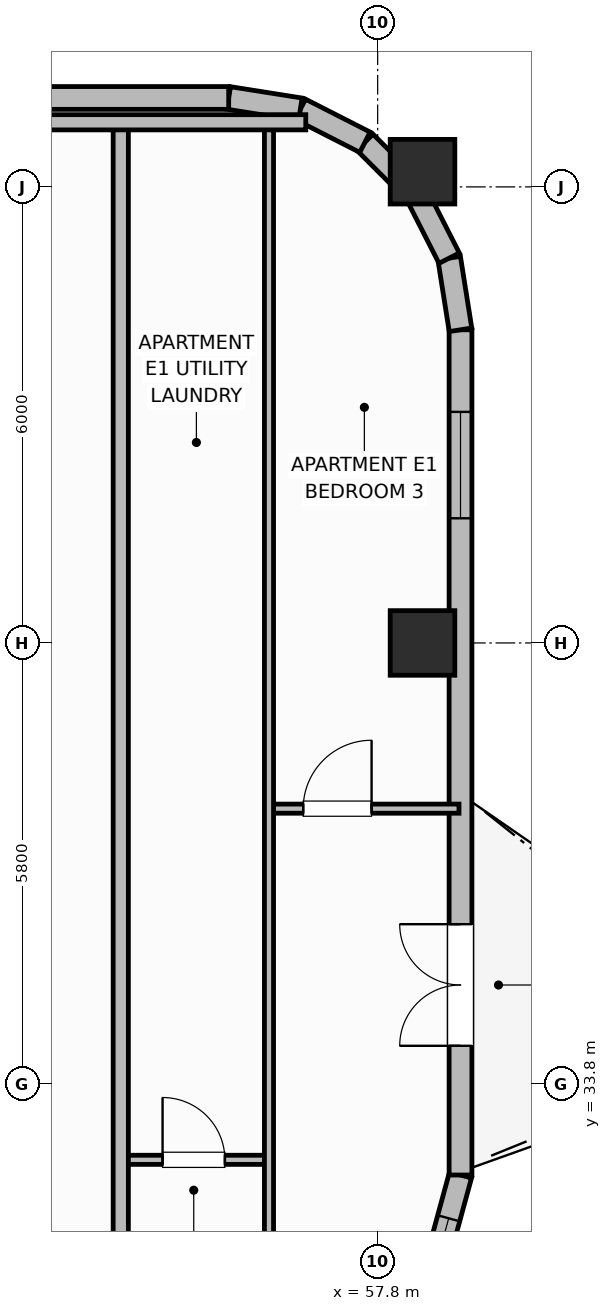
"""IFC4 building model, lengths in metres.
Left out: names, types, materials, properties, quantities, classifications, styles, units other than length and angle.
Written with IfcOpenShell. Run it as: python <this file> out.ifc"""

import sys

from ifc_helpers import new_model, si_unit, direction, frame, frame_2d, origin, origin_2d, place, context, subcontext, project, spatial, rectangle, extrude, element, fill, save


model = new_model("IFC4")
c1 = context("Model", 3, precision=1e-05, world=origin(), true_north=direction((0.0, 1.0)))
c2 = subcontext(c1, "Body", "Model", "MODEL_VIEW")
j1 = project(units=[si_unit("LENGTHUNIT", "METRE"), si_unit("PLANEANGLEUNIT", "RADIAN")], contexts=[c1])
p1 = place(None, origin())
s1 = spatial("IfcSite", under=j1, at=p1, CompositionType="ELEMENT")
p2 = place(p1, origin())
s2 = spatial("IfcBuilding", under=s1, at=p2, CompositionType="ELEMENT")
p3 = place(p2, frame((0.0, 0.0, 248.0)))
s3 = spatial("IfcBuildingStorey", under=s2, at=p3, CompositionType="ELEMENT", Elevation=248.0)
for number, where, z_axis, x_axis in (
    (1, (58.39, 39.6, 0.0), (0.0, 0.0, 1.0), (1.0, 0.0, 0.0)),
    (2, (58.39, 45.8, 0.0), (0.0, 0.0, 1.0), (1.0, 0.0, 0.0)),
):
    element("IfcColumn", number, at=place(p3, frame(where, z_axis=z_axis, x_axis=x_axis)), inside=s3, PredefinedType="COLUMN", context=c2, shape_type="SweptSolid", body=[
        extrude(rectangle(XDim=0.85, YDim=0.85, at=origin_2d()), origin(), (0.0, 0.0, 1.0), 3.7),
    ])
p4 = place(p3, frame((58.29, 30.4, 0.0), z_axis=(0.0, 0.0, 1.0), x_axis=(0.263035877812, 0.96478605244, 0.0)))
e3 = element("IfcWall", 3, at=p4, inside=s3, PredefinedType="SOLIDWALL", context=c2, shape_type="SweptSolid", body=[
    extrude(rectangle(XDim=2.281, YDim=0.3, at=frame_2d((1.14, 0.0))), origin(), (0.0, 0.0, 1.0), 2.73),
])
p5 = place(p4, frame((0.59, 0.0, 0.92)))
e4 = element("IfcOpeningElement", 4, at=p5, cuts=e3, PredefinedType="OPENING", context=c2, shape_type="SweptSolid", body=[
    extrude(rectangle(XDim=1.1, YDim=1.65, at=frame_2d((0.55, 0.825))), frame((0.0, 0.16, 0.0), z_axis=(0.0, -1.0, 0.0), x_axis=(1.0, 0.0, 0.0)), (0.0, 0.0, 1.0), 0.32),
])
p6 = place(p3, frame((58.89, 32.6, 0.0), z_axis=(0.0, 0.0, 1.0), x_axis=(0.0, 1.0, 0.0)))
e5 = element("IfcWall", 5, at=p6, inside=s3, PredefinedType="SOLIDWALL", context=c2, shape_type="SweptSolid", body=[
    extrude(rectangle(XDim=11.12, YDim=0.3, at=frame_2d((5.56, 0.0))), origin(), (0.0, 0.0, 1.0), 2.73),
])
p7 = place(p6, frame((1.7, 0.0, 0.0)))
e6 = element("IfcOpeningElement", 6, at=p7, cuts=e5, PredefinedType="OPENING", context=c2, shape_type="SweptSolid", body=[
    extrude(rectangle(XDim=1.6, YDim=2.1, at=frame_2d((0.8, 1.05))), frame((0.0, 0.16, 0.0), z_axis=(0.0, -1.0, 0.0), x_axis=(1.0, 0.0, 0.0)), (0.0, 0.0, 1.0), 0.32),
])
p8 = place(p6, frame((8.64, 0.0, 0.72)))
e7 = element("IfcOpeningElement", 7, at=p8, cuts=e5, PredefinedType="OPENING", context=c2, shape_type="SweptSolid", body=[
    extrude(rectangle(XDim=1.4, YDim=1.85, at=frame_2d((0.7, 0.925))), frame((0.0, 0.16, 0.0), z_axis=(0.0, -1.0, 0.0), x_axis=(1.0, 0.0, 0.0)), (0.0, 0.0, 1.0), 0.32),
])
p9 = place(p3, frame((58.89, 43.72, 0.0), z_axis=(0.0, 0.0, 1.0), x_axis=(-0.156304114255, 0.987708977314, 0.0)))
e8 = element("IfcWall", 8, at=p9, inside=s3, PredefinedType="SOLIDWALL", context=c2, shape_type="SweptSolid", body=[
    extrude(rectangle(XDim=0.954, YDim=0.3, at=frame_2d((0.477, 0.0))), origin(), (0.0, 0.0, 1.0), 2.73),
])
p10 = place(p3, frame((58.741, 44.663, 0.0), z_axis=(0.0, 0.0, 1.0), x_axis=(-0.45395644796, 0.891023873617, 0.0)))
e9 = element("IfcWall", 9, at=p10, inside=s3, PredefinedType="SOLIDWALL", context=c2, shape_type="SweptSolid", body=[
    extrude(rectangle(XDim=0.954, YDim=0.3, at=frame_2d((0.477, 0.0))), origin(), (0.0, 0.0, 1.0), 2.73),
])
for number, where, z_axis, x_axis in (
    (10, (58.308, 45.513, 0.0), (0.0, 0.0, 1.0), (-0.707, 0.707, 0.0)),
    (11, (57.633, 46.188, 0.0), (0.0, 0.0, 1.0), (-0.891, 0.454, 0.0)),
):
    element("IfcWall", number, at=place(p3, frame(where, z_axis=z_axis, x_axis=x_axis)), inside=s3, PredefinedType="SOLIDWALL", context=c2, shape_type="SweptSolid", body=[
        extrude(rectangle(XDim=0.954, YDim=0.3, at=frame_2d((0.477, 0.0))), origin(), (0.0, 0.0, 1.0), 2.73),
    ])
p11 = place(p3, frame((56.782, 46.621, 0.0), z_axis=(0.0, 0.0, 1.0), x_axis=(-0.987663181641, 0.156593229835, 0.0)))
e12 = element("IfcWall", 12, at=p11, inside=s3, PredefinedType="SOLIDWALL", context=c2, shape_type="SweptSolid", body=[
    extrude(rectangle(XDim=0.954, YDim=0.3, at=frame_2d((0.477, 0.0))), origin(), (0.0, 0.0, 1.0), 2.73),
])
p12 = place(p3, frame((55.84, 46.77, 0.0), z_axis=(0.0, 0.0, 1.0), x_axis=(-1.0, 0.0, 0.0)))
e13 = element("IfcWall", 13, at=p12, inside=s3, PredefinedType="SOLIDWALL", context=c2, shape_type="SweptSolid", body=[
    extrude(rectangle(XDim=33.28, YDim=0.3, at=frame_2d((16.64, 0.0))), origin(), (0.0, 0.0, 1.0), 2.73),
])
p13 = place(p12, frame((4.547, 0.0, 0.76)))
e14 = element("IfcOpeningElement", 14, at=p13, cuts=e13, PredefinedType="OPENING", context=c2, shape_type="SweptSolid", body=[
    extrude(rectangle(XDim=1.8, YDim=1.85, at=frame_2d((0.9, 0.925))), frame((0.0, 0.16, 0.0), z_axis=(0.0, -1.0, 0.0), x_axis=(1.0, 0.0, 0.0)), (0.0, 0.0, 1.0), 0.32),
])
p14 = place(p12, frame((7.745, 0.0, 0.76)))
e15 = element("IfcOpeningElement", 15, at=p14, cuts=e13, PredefinedType="OPENING", context=c2, shape_type="SweptSolid", body=[
    extrude(rectangle(XDim=1.8, YDim=1.85, at=frame_2d((0.9, 0.925))), frame((0.0, 0.16, 0.0), z_axis=(0.0, -1.0, 0.0), x_axis=(1.0, 0.0, 0.0)), (0.0, 0.0, 1.0), 0.32),
])
p15 = place(p12, frame((14.141, 0.0, 0.76)))
e16 = element("IfcOpeningElement", 16, at=p15, cuts=e13, PredefinedType="OPENING", context=c2, shape_type="SweptSolid", body=[
    extrude(rectangle(XDim=1.8, YDim=1.85, at=frame_2d((0.9, 0.925))), frame((0.0, 0.16, 0.0), z_axis=(0.0, -1.0, 0.0), x_axis=(1.0, 0.0, 0.0)), (0.0, 0.0, 1.0), 0.32),
])
p16 = place(p12, frame((17.339, 0.0, 0.76)))
e17 = element("IfcOpeningElement", 17, at=p16, cuts=e13, PredefinedType="OPENING", context=c2, shape_type="SweptSolid", body=[
    extrude(rectangle(XDim=1.8, YDim=1.85, at=frame_2d((0.9, 0.925))), frame((0.0, 0.16, 0.0), z_axis=(0.0, -1.0, 0.0), x_axis=(1.0, 0.0, 0.0)), (0.0, 0.0, 1.0), 0.32),
])
p17 = place(p12, frame((23.735, 0.0, 0.76)))
e18 = element("IfcOpeningElement", 18, at=p17, cuts=e13, PredefinedType="OPENING", context=c2, shape_type="SweptSolid", body=[
    extrude(rectangle(XDim=1.8, YDim=1.85, at=frame_2d((0.9, 0.925))), frame((0.0, 0.16, 0.0), z_axis=(0.0, -1.0, 0.0), x_axis=(1.0, 0.0, 0.0)), (0.0, 0.0, 1.0), 0.32),
])
p18 = place(p12, frame((26.933, 0.0, 0.76)))
e19 = element("IfcOpeningElement", 19, at=p18, cuts=e13, PredefinedType="OPENING", context=c2, shape_type="SweptSolid", body=[
    extrude(rectangle(XDim=1.8, YDim=1.85, at=frame_2d((0.9, 0.925))), frame((0.0, 0.16, 0.0), z_axis=(0.0, -1.0, 0.0), x_axis=(1.0, 0.0, 0.0)), (0.0, 0.0, 1.0), 0.32),
])
p19 = place(p3, frame((54.42, 32.8, 0.0), z_axis=(0.0, 0.0, 1.0), x_axis=(1.0, 0.0, 0.0)))
e20 = element("IfcWall", 20, at=p19, inside=s3, PredefinedType="PARTITIONING", context=c2, shape_type="SweptSolid", body=[
    extrude(rectangle(XDim=1.95, YDim=0.12, at=frame_2d((0.975, 0.0))), origin(), (0.0, 0.0, 1.0), 2.56),
])
p20 = place(p19, frame((0.55, 0.0, 0.0)))
e21 = element("IfcOpeningElement", 21, at=p20, cuts=e20, PredefinedType="OPENING", context=c2, shape_type="SweptSolid", body=[
    extrude(rectangle(XDim=0.82, YDim=2.08, at=frame_2d((0.41, 1.04))), frame((0.0, 0.07, 0.0), z_axis=(0.0, -1.0, 0.0), x_axis=(1.0, 0.0, 0.0)), (0.0, 0.0, 1.0), 0.14),
])
p21 = place(p3, frame((56.37, 37.42, 0.0), z_axis=(0.0, 0.0, 1.0), x_axis=(1.0, 0.0, 0.0)))
e22 = element("IfcWall", 22, at=p21, inside=s3, PredefinedType="PARTITIONING", context=c2, shape_type="SweptSolid", body=[
    extrude(rectangle(XDim=2.5, YDim=0.12, at=frame_2d((1.25, 0.0))), origin(), (0.0, 0.0, 1.0), 2.56),
])
p22 = place(p21, frame((0.45, 0.0, 0.0)))
e23 = element("IfcOpeningElement", 23, at=p22, cuts=e22, PredefinedType="OPENING", context=c2, shape_type="SweptSolid", body=[
    extrude(rectangle(XDim=0.9, YDim=2.1, at=frame_2d((0.45, 1.05))), frame((0.0, 0.07, 0.0), z_axis=(0.0, -1.0, 0.0), x_axis=(1.0, 0.0, 0.0)), (0.0, 0.0, 1.0), 0.14),
])
p23 = place(p3, frame((56.37, 9.99, 0.0), z_axis=(0.0, 0.0, 1.0), x_axis=(0.0, 1.0, 0.0)))
e24 = element("IfcWall", 24, at=p23, inside=s3, PredefinedType="PARTITIONING", context=c2, shape_type="SweptSolid", body=[
    extrude(rectangle(XDim=36.42, YDim=0.12, at=frame_2d((18.21, 0.0))), origin(), (0.0, 0.0, 1.0), 2.56),
])
p24 = place(p23, frame((0.41, 0.0, 0.0)))
e25 = element("IfcOpeningElement", 25, at=p24, cuts=e24, PredefinedType="OPENING", context=c2, shape_type="SweptSolid", body=[
    extrude(rectangle(XDim=0.9, YDim=2.1, at=frame_2d((0.45, 1.05))), frame((0.0, 0.07, 0.0), z_axis=(0.0, -1.0, 0.0), x_axis=(1.0, 0.0, 0.0)), (0.0, 0.0, 1.0), 0.14),
])
p25 = place(p23, frame((15.56, 0.0, 0.0)))
e26 = element("IfcOpeningElement", 26, at=p25, cuts=e24, PredefinedType="OPENING", context=c2, shape_type="SweptSolid", body=[
    extrude(rectangle(XDim=0.82, YDim=2.08, at=frame_2d((0.41, 1.04))), frame((0.0, 0.07, 0.0), z_axis=(0.0, -1.0, 0.0), x_axis=(1.0, 0.0, 0.0)), (0.0, 0.0, 1.0), 0.14),
])
p26 = place(p3, frame((54.42, 9.95, 0.0), z_axis=(0.0, 0.0, 1.0), x_axis=(0.0, 1.0, 0.0)))
e27 = element("IfcWall", 27, at=p26, inside=s3, PredefinedType="PARTITIONING", context=c2, shape_type="SweptSolid", body=[
    extrude(rectangle(XDim=36.5, YDim=0.2, at=frame_2d((18.25, 0.0))), origin(), (0.0, 0.0, 1.0), 2.56),
])
p27 = place(p26, frame((3.25, 0.0, 0.0)))
e28 = element("IfcOpeningElement", 28, at=p27, cuts=e27, PredefinedType="OPENING", context=c2, shape_type="SweptSolid", body=[
    extrude(rectangle(XDim=1.0, YDim=2.15, at=frame_2d((0.5, 1.075))), frame((0.0, 0.11, 0.0), z_axis=(0.0, -1.0, 0.0), x_axis=(1.0, 0.0, 0.0)), (0.0, 0.0, 1.0), 0.22),
])
p28 = place(p3, frame((53.1, 46.45, 0.0), z_axis=(0.0, 0.0, 1.0), x_axis=(1.0, 0.0, 0.0)))
e29 = element("IfcWall", 29, at=p28, inside=s3, PredefinedType="PARTITIONING", context=c2, shape_type="SweptSolid", body=[
    extrude(rectangle(XDim=3.754, YDim=0.2, at=frame_2d((1.877, 0.0))), origin(), (0.0, 0.0, 1.0), 2.56),
])
p29 = place(p5, origin())
e30 = element("IfcWindow", 30, at=p29, inside=s3, PartitioningType="SINGLE_PANEL", PredefinedType="WINDOW", context=c2, shape_type="SweptSolid", body=[
    extrude(rectangle(XDim=1.1, YDim=1.65, at=frame_2d((0.55, 0.825))), frame((0.0, 0.03, 0.0), z_axis=(0.0, -1.0, 0.0), x_axis=(1.0, 0.0, 0.0)), (0.0, 0.0, 1.0), 0.06),
])
fill(e4, e30)
p30 = place(p7, origin())
e31 = element("IfcDoor", 31, at=p30, inside=s3, OperationType="DOUBLE_DOOR_SINGLE_SWING", PredefinedType="DOOR", context=c2, shape_type="SweptSolid", body=[
    extrude(rectangle(XDim=1.6, YDim=2.1, at=frame_2d((0.8, 1.05))), frame((0.0, 0.025, 0.0), z_axis=(0.0, -1.0, 0.0), x_axis=(1.0, 0.0, 0.0)), (0.0, 0.0, 1.0), 0.05),
])
fill(e6, e31)
p31 = place(p8, origin())
e32 = element("IfcWindow", 32, at=p31, inside=s3, PartitioningType="SINGLE_PANEL", PredefinedType="WINDOW", context=c2, shape_type="SweptSolid", body=[
    extrude(rectangle(XDim=1.4, YDim=1.85, at=frame_2d((0.7, 0.925))), frame((0.0, 0.03, 0.0), z_axis=(0.0, -1.0, 0.0), x_axis=(1.0, 0.0, 0.0)), (0.0, 0.0, 1.0), 0.06),
])
fill(e7, e32)
p32 = place(p20, origin())
e33 = element("IfcDoor", 33, at=p32, inside=s3, OperationType="SINGLE_SWING_LEFT", PredefinedType="DOOR", context=c2, shape_type="SweptSolid", body=[
    extrude(rectangle(XDim=0.82, YDim=2.08, at=frame_2d((0.41, 1.04))), frame((0.0, 0.025, 0.0), z_axis=(0.0, -1.0, 0.0), x_axis=(1.0, 0.0, 0.0)), (0.0, 0.0, 1.0), 0.05),
])
fill(e21, e33)
p33 = place(p22, origin())
e34 = element("IfcDoor", 34, at=p33, inside=s3, OperationType="SINGLE_SWING_RIGHT", PredefinedType="DOOR", context=c2, shape_type="SweptSolid", body=[
    extrude(rectangle(XDim=0.9, YDim=2.1, at=frame_2d((0.45, 1.05))), frame((0.0, 0.025, 0.0), z_axis=(0.0, -1.0, 0.0), x_axis=(1.0, 0.0, 0.0)), (0.0, 0.0, 1.0), 0.05),
])
fill(e23, e34)
save(model, sys.argv[1])
